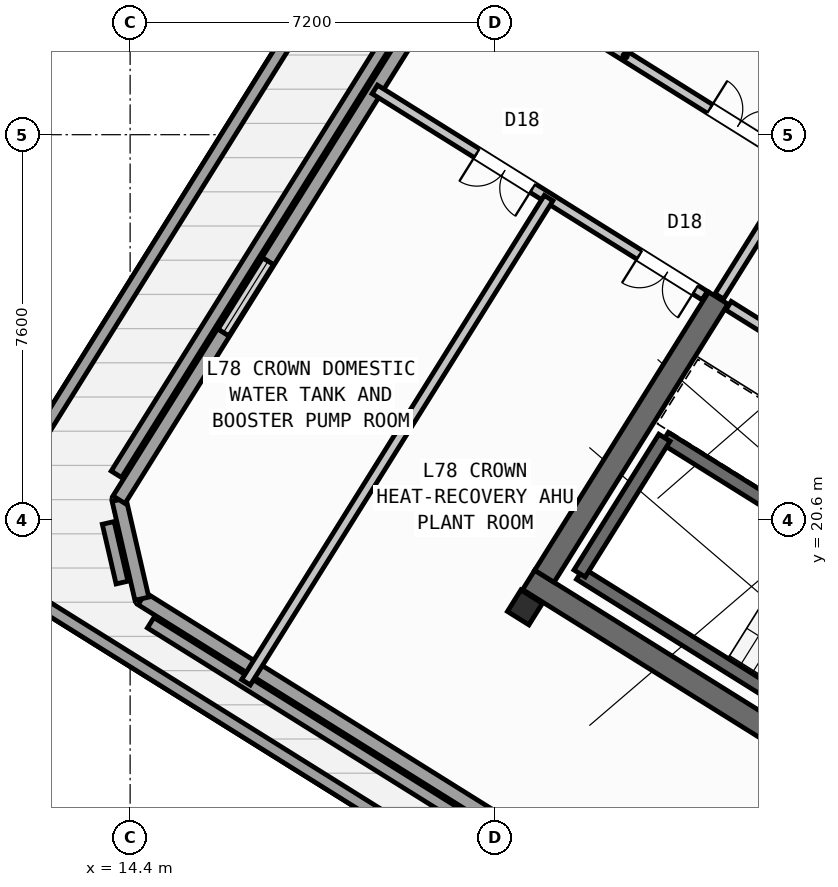
"""IFC4 building model, lengths in metres.
Left out: names, types, materials, properties, quantities, classifications, styles, units other than length and angle.
Written with IfcOpenShell. Run it as: python <this file> out.ifc"""

import sys

from ifc_helpers import new_model, si_unit, direction, frame, frame_2d, origin, origin_2d, place, context, subcontext, project, spatial, rectangle, hollow_rectangle, extrude, source, transform, mapped, element, fill, save


model = new_model("IFC4")
c1 = context("Model", 3, precision=1e-05, world=origin(), true_north=direction((0.0, 1.0)))
c2 = subcontext(c1, "Body", "Model", "MODEL_VIEW")
j1 = project(units=[si_unit("LENGTHUNIT", "METRE"), si_unit("PLANEANGLEUNIT", "RADIAN")], contexts=[c1])
p1 = place(None, origin())
s1 = spatial("IfcSite", under=j1, at=p1, CompositionType="ELEMENT")
p2 = place(p1, origin())
s2 = spatial("IfcBuilding", under=s1, at=p2, CompositionType="ELEMENT")
p3 = place(p2, frame((0.0, 0.0, 306.0)))
s3 = spatial("IfcBuildingStorey", under=s2, at=p3, CompositionType="ELEMENT", Elevation=306.0)
p4 = place(p3, frame((33.324, 12.503, 0.0), z_axis=(0.0, 0.0, 1.0), x_axis=(-0.848043529849, 0.529926571782, 0.0)))
e1 = element("IfcWall", 1, at=p4, inside=s3, PredefinedType="SHEAR", context=c2, shape_type="SweptSolid", body=[
    extrude(rectangle(XDim=13.04, YDim=0.45, at=frame_2d((6.52, 0.0))), origin(), (0.0, 0.0, 1.0), 3.32),
])
p5 = place(p3, frame((26.007, 24.976, 0.0), z_axis=(0.0, 0.0, 1.0), x_axis=(-0.529931155655, -0.848040665456, 0.0)))
e2 = element("IfcWall", 2, at=p5, inside=s3, PredefinedType="SHEAR", context=c2, shape_type="SweptSolid", body=[
    extrude(rectangle(XDim=6.475, YDim=0.45, at=frame_2d((3.238, 0.0))), origin(), (0.0, 0.0, 1.0), 3.32),
])
m1 = source(origin(), c2, "Body", "SweptSolid", [
    extrude(hollow_rectangle(XDim=0.5, YDim=0.5, WallThickness=0.025, at=origin_2d()), origin(), (0.0, 0.0, 1.0), 3.6),
])
p6 = place(p3, frame((22.191, 18.87, 0.0), z_axis=(0.0, 0.0, 1.0), x_axis=(-0.848048096156, 0.529919264233, 0.0)))
e3 = element("IfcColumn", 3, at=p6, inside=s3, PredefinedType="COLUMN", context=c2, shape_type="MappedRepresentation", body=[
    mapped(m1, transform((0.0, 0.0, 0.0), scale=1.0)),
])
p7 = place(p3, frame((29.733, 8.261, 0.0), z_axis=(0.0, 0.0, 1.0), x_axis=(-0.848045488864, 0.529923436751, 0.0)))
e4 = element("IfcWall", 4, at=p7, inside=s3, PredefinedType="PARAPET", context=c2, shape_type="SweptSolid", body=[
    extrude(rectangle(XDim=20.056, YDim=0.24, at=frame_2d((10.028, 0.0))), origin(), (0.0, 0.0, 1.0), 1.15),
])
p8 = place(p3, frame((12.129, 21.469, 0.0), z_axis=(0.0, 0.0, 1.0), x_axis=(0.529920637882, 0.848047237804, 0.0)))
e5 = element("IfcWall", 5, at=p8, inside=s3, PredefinedType="PARAPET", context=c2, shape_type="SweptSolid", body=[
    extrude(rectangle(XDim=16.256, YDim=0.24, at=frame_2d((8.128, 0.0))), origin(), (0.0, 0.0, 1.0), 1.15),
])
p9 = place(p3, frame((22.203, 34.42, 0.0), z_axis=(0.0, 0.0, 1.0), x_axis=(-0.529922606747, -0.848046007513, 0.0)))
e6 = element("IfcWall", 6, at=p9, inside=s3, PredefinedType="PARAPET", context=c2, shape_type="SweptSolid", body=[
    extrude(rectangle(XDim=15.238, YDim=0.24, at=frame_2d((7.619, 0.0))), origin(), (0.0, 0.0, 1.0), 1.15),
])
p10 = place(p3, frame((13.968, 20.538, 0.0), z_axis=(0.0, 0.0, 1.0), x_axis=(0.225051308725, -0.974346913805, 0.0)))
e7 = element("IfcWall", 7, at=p10, inside=s3, PredefinedType="PARAPET", context=c2, shape_type="SweptSolid", body=[
    extrude(rectangle(XDim=1.208, YDim=0.24, at=frame_2d((0.604, 0.0))), origin(), (0.0, 0.0, 1.0), 1.15),
])
p11 = place(p3, frame((14.805, 18.568, 0.0), z_axis=(0.0, 0.0, 1.0), x_axis=(0.848046564959, -0.529921714653, 0.0)))
e8 = element("IfcWall", 8, at=p11, inside=s3, PredefinedType="PARAPET", context=c2, shape_type="SweptSolid", body=[
    extrude(rectangle(XDim=18.188, YDim=0.24, at=frame_2d((9.094, 0.0))), origin(), (0.0, 0.0, 1.0), 1.15),
])
p12 = place(p3, frame((30.731, 8.982, 0.0), z_axis=(0.0, 0.0, 1.0), x_axis=(-0.848046707212, 0.529921487002, 0.0)))
e9 = element("IfcWall", 9, at=p12, inside=s3, PredefinedType="STANDARD", context=c2, shape_type="SweptSolid", body=[
    extrude(rectangle(XDim=18.984, YDim=0.28, at=frame_2d((9.492, 0.0))), origin(), (0.0, 0.0, 1.0), 3.32),
])
p13 = place(p12, frame((7.283, 0.0, 0.85)))
e10 = element("IfcOpeningElement", 10, at=p13, cuts=e9, PredefinedType="OPENING", context=c2, shape_type="SweptSolid", body=[
    extrude(rectangle(XDim=1.7, YDim=1.6, at=frame_2d((0.85, 0.8))), frame((0.0, 0.15, 0.0), z_axis=(0.0, -1.0, 0.0), x_axis=(1.0, 0.0, 0.0)), (0.0, 0.0, 1.0), 0.3),
])
p14 = place(p3, frame((14.632, 19.042, 0.0), z_axis=(0.0, 0.0, 1.0), x_axis=(-0.224992881738, 0.974360407225, 0.0)))
e11 = element("IfcWall", 11, at=p14, inside=s3, PredefinedType="STANDARD", context=c2, shape_type="SweptSolid", body=[
    extrude(rectangle(XDim=2.005, YDim=0.28, at=frame_2d((1.003, 0.0))), origin(), (0.0, 0.0, 1.0), 3.32),
])
p15 = place(p3, frame((14.18, 20.996, 0.0), z_axis=(0.0, 0.0, 1.0), x_axis=(0.529922292894, 0.848046203632, 0.0)))
e12 = element("IfcWall", 12, at=p15, inside=s3, PredefinedType="STANDARD", context=c2, shape_type="SweptSolid", body=[
    extrude(rectangle(XDim=16.034, YDim=0.28, at=frame_2d((8.017, 0.0))), origin(), (0.0, 0.0, 1.0), 3.32),
])
p16 = place(p15, frame((3.871, 0.0, 0.85)))
e13 = element("IfcOpeningElement", 13, at=p16, cuts=e12, PredefinedType="OPENING", context=c2, shape_type="SweptSolid", body=[
    extrude(rectangle(XDim=1.7, YDim=1.6, at=frame_2d((0.85, 0.8))), frame((0.0, 0.15, 0.0), z_axis=(0.0, -1.0, 0.0), x_axis=(1.0, 0.0, 0.0)), (0.0, 0.0, 1.0), 0.3),
])
p17 = place(p15, frame((13.578, 0.0, 0.85)))
e14 = element("IfcOpeningElement", 14, at=p17, cuts=e12, PredefinedType="OPENING", context=c2, shape_type="SweptSolid", body=[
    extrude(rectangle(XDim=1.7, YDim=1.6, at=frame_2d((0.85, 0.8))), frame((0.0, 0.15, 0.0), z_axis=(0.0, -1.0, 0.0), x_axis=(1.0, 0.0, 0.0)), (0.0, 0.0, 1.0), 0.3),
])
p18 = place(p3, frame((24.631, 35.045, 0.0), z_axis=(0.0, 0.0, 1.0), x_axis=(0.848046707212, -0.529921487002, 0.0)))
e15 = element("IfcWall", 15, at=p18, inside=s3, PredefinedType="STANDARD", context=c2, shape_type="SweptSolid", body=[
    extrude(rectangle(XDim=18.984, YDim=0.28, at=frame_2d((9.492, 0.0))), origin(), (0.0, 0.0, 1.0), 3.32),
])
p19 = place(p18, frame((2.326, 0.0, 0.85)))
e16 = element("IfcOpeningElement", 16, at=p19, cuts=e15, PredefinedType="OPENING", context=c2, shape_type="SweptSolid", body=[
    extrude(rectangle(XDim=1.7, YDim=1.6, at=frame_2d((0.85, 0.8))), frame((0.0, 0.15, 0.0), z_axis=(0.0, -1.0, 0.0), x_axis=(1.0, 0.0, 0.0)), (0.0, 0.0, 1.0), 0.3),
])
p20 = place(p18, frame((11.968, 0.0, 0.85)))
e17 = element("IfcOpeningElement", 17, at=p20, cuts=e15, PredefinedType="OPENING", context=c2, shape_type="SweptSolid", body=[
    extrude(rectangle(XDim=1.7, YDim=1.6, at=frame_2d((0.85, 0.8))), frame((0.0, 0.15, 0.0), z_axis=(0.0, -1.0, 0.0), x_axis=(1.0, 0.0, 0.0)), (0.0, 0.0, 1.0), 0.3),
])
p21 = place(p3, frame((29.605, 15.581, 0.0), z_axis=(0.0, 0.0, 1.0), x_axis=(-0.848036911448, 0.529937163087, 0.0)))
e18 = element("IfcWall", 18, at=p21, inside=s3, PredefinedType="SHEAR", context=c2, shape_type="SweptSolid", body=[
    extrude(rectangle(XDim=7.46, YDim=0.26, at=frame_2d((3.73, 0.0))), origin(), (0.0, 0.0, 1.0), 3.32),
])
p22 = place(p3, frame((31.28, 18.261, 0.0), z_axis=(0.0, 0.0, 1.0), x_axis=(-0.848051618787, 0.529913626805, 0.0)))
e19 = element("IfcWall", 19, at=p22, inside=s3, PredefinedType="SHEAR", context=c2, shape_type="SweptSolid", body=[
    extrude(rectangle(XDim=7.46, YDim=0.26, at=frame_2d((3.73, 0.0))), origin(), (0.0, 0.0, 1.0), 3.32),
])
p23 = place(p22, frame((0.36, 0.0, 0.0)))
e20 = element("IfcOpeningElement", 20, at=p23, cuts=e19, PredefinedType="OPENING", context=c2, shape_type="SweptSolid", body=[
    extrude(rectangle(XDim=0.86, YDim=2.05, at=frame_2d((0.43, 1.025))), frame((0.0, 0.14, 0.0), z_axis=(0.0, -1.0, 0.0), x_axis=(1.0, 0.0, 0.0)), (0.0, 0.0, 1.0), 0.28),
])
p24 = place(p3, frame((24.945, 22.22, 0.0), z_axis=(0.0, 0.0, 1.0), x_axis=(-0.529908658664, -0.84805472316, 0.0)))
e21 = element("IfcWall", 21, at=p24, inside=s3, PredefinedType="SHEAR", context=c2, shape_type="SweptSolid", body=[
    extrude(rectangle(XDim=3.16, YDim=0.26, at=frame_2d((1.58, 0.0))), origin(), (0.0, 0.0, 1.0), 3.32),
])
p25 = place(p3, frame((31.525, 21.504, 0.0), z_axis=(0.0, 0.0, 1.0), x_axis=(-0.848042066329, 0.529928913853, 0.0)))
e22 = element("IfcWall", 22, at=p25, inside=s3, PredefinedType="STANDARD", context=c2, shape_type="SweptSolid", body=[
    extrude(rectangle(XDim=6.268, YDim=0.2, at=frame_2d((3.134, 0.0))), origin(), (0.0, 0.0, 1.0), 3.31),
])
p26 = place(p25, frame((4.4, 0.0, 0.0)))
e23 = element("IfcOpeningElement", 23, at=p26, cuts=e22, PredefinedType="OPENING", context=c2, shape_type="SweptSolid", body=[
    extrude(rectangle(XDim=0.86, YDim=2.05, at=frame_2d((0.43, 1.025))), frame((0.0, 0.11, 0.0), z_axis=(0.0, -1.0, 0.0), x_axis=(1.0, 0.0, 0.0)), (0.0, 0.0, 1.0), 0.22),
])
p27 = place(p25, frame((0.35, 0.0, 0.0)))
e24 = element("IfcOpeningElement", 24, at=p27, cuts=e22, PredefinedType="OPENING", context=c2, shape_type="SweptSolid", body=[
    extrude(rectangle(XDim=0.86, YDim=2.05, at=frame_2d((0.43, 1.025))), frame((0.0, 0.11, 0.0), z_axis=(0.0, -1.0, 0.0), x_axis=(1.0, 0.0, 0.0)), (0.0, 0.0, 1.0), 0.22),
])
p28 = place(p3, frame((27.596, 27.52, 0.0), z_axis=(0.0, 0.0, 1.0), x_axis=(-0.529865479138, -0.848081702443, 0.0)))
e25 = element("IfcWall", 25, at=p28, inside=s3, PredefinedType="STANDARD", context=c2, shape_type="SweptSolid", body=[
    extrude(rectangle(XDim=2.96, YDim=0.2, at=frame_2d((1.48, 0.0))), origin(), (0.0, 0.0, 1.0), 3.31),
])
p29 = place(p28, frame((0.16, 0.0, 0.0)))
e26 = element("IfcOpeningElement", 26, at=p29, cuts=e25, PredefinedType="OPENING", context=c2, shape_type="SweptSolid", body=[
    extrude(rectangle(XDim=0.86, YDim=2.05, at=frame_2d((0.43, 1.025))), frame((0.0, 0.11, 0.0), z_axis=(0.0, -1.0, 0.0), x_axis=(1.0, 0.0, 0.0)), (0.0, 0.0, 1.0), 0.22),
])
p30 = place(p3, frame((25.74, 25.025, 0.0), z_axis=(0.0, 0.0, 1.0), x_axis=(-0.848051891756, 0.529913189956, 0.0)))
e27 = element("IfcWall", 27, at=p30, inside=s3, PredefinedType="STANDARD", context=c2, shape_type="SweptSolid", body=[
    extrude(rectangle(XDim=7.678, YDim=0.2, at=frame_2d((3.839, 0.0))), origin(), (0.0, 0.0, 1.0), 3.31),
])
p31 = place(p30, frame((0.218, 0.0, 0.0)))
e28 = element("IfcOpeningElement", 28, at=p31, cuts=e27, PredefinedType="OPENING", context=c2, shape_type="SweptSolid", body=[
    extrude(rectangle(XDim=1.3, YDim=2.15, at=frame_2d((0.65, 1.075))), frame((0.0, 0.11, 0.0), z_axis=(0.0, -1.0, 0.0), x_axis=(1.0, 0.0, 0.0)), (0.0, 0.0, 1.0), 0.22),
])
p32 = place(p30, frame((4.003, 0.0, 0.0)))
e29 = element("IfcOpeningElement", 29, at=p32, cuts=e27, PredefinedType="OPENING", context=c2, shape_type="SweptSolid", body=[
    extrude(rectangle(XDim=1.3, YDim=2.15, at=frame_2d((0.65, 1.075))), frame((0.0, 0.11, 0.0), z_axis=(0.0, -1.0, 0.0), x_axis=(1.0, 0.0, 0.0)), (0.0, 0.0, 1.0), 0.22),
])
p33 = place(p3, frame((22.659, 26.95, 0.0), z_axis=(0.0, 0.0, 1.0), x_axis=(-0.52992299529, -0.848045764722, 0.0)))
e30 = element("IfcWall", 30, at=p33, inside=s3, PredefinedType="STANDARD", context=c2, shape_type="SweptSolid", body=[
    extrude(rectangle(XDim=11.27, YDim=0.2, at=frame_2d((5.635, 0.0))), origin(), (0.0, 0.0, 1.0), 3.31),
])
p34 = place(p3, frame((27.425, 27.721, 0.0), z_axis=(0.0, 0.0, 1.0), x_axis=(-0.848060820519, 0.529898900452, 0.0)))
e31 = element("IfcWall", 31, at=p34, inside=s3, PredefinedType="STANDARD", context=c2, shape_type="SweptSolid", body=[
    extrude(rectangle(XDim=7.678, YDim=0.2, at=frame_2d((3.839, 0.0))), origin(), (0.0, 0.0, 1.0), 3.31),
])
p35 = place(p34, frame((0.568, 0.0, 0.0)))
e32 = element("IfcOpeningElement", 32, at=p35, cuts=e31, PredefinedType="OPENING", context=c2, shape_type="SweptSolid", body=[
    extrude(rectangle(XDim=1.3, YDim=2.15, at=frame_2d((0.65, 1.075))), frame((0.0, 0.11, 0.0), z_axis=(0.0, -1.0, 0.0), x_axis=(1.0, 0.0, 0.0)), (0.0, 0.0, 1.0), 0.22),
])
m2 = source(origin(), c2, "Body", "SweptSolid", [
    extrude(rectangle(XDim=1.7, YDim=1.6, at=frame_2d((0.85, 0.8))), frame((0.0, 0.03, 0.0), z_axis=(0.0, -1.0, 0.0), x_axis=(1.0, 0.0, 0.0)), (0.0, 0.0, 1.0), 0.06),
])
p36 = place(p16, origin())
e33 = element("IfcWindow", 33, at=p36, inside=s3, PartitioningType="SINGLE_PANEL", PredefinedType="WINDOW", context=c2, shape_type="MappedRepresentation", body=[
    mapped(m2, transform((0.0, 0.0, 0.0), scale=1.0)),
])
fill(e13, e33)
m3 = source(origin(), c2, "Body", "SweptSolid", [
    extrude(rectangle(XDim=1.3, YDim=2.15, at=frame_2d((0.65, 1.075))), frame((0.0, 0.025, 0.0), z_axis=(0.0, -1.0, 0.0), x_axis=(1.0, 0.0, 0.0)), (0.0, 0.0, 1.0), 0.05),
])
p37 = place(p31, origin())
e34 = element("IfcDoor", 34, at=p37, inside=s3, OperationType="DOUBLE_DOOR_SINGLE_SWING", PredefinedType="DOOR", context=c2, shape_type="MappedRepresentation", body=[
    mapped(m3, transform((0.0, 0.0, 0.0), scale=1.0)),
])
fill(e28, e34)
p38 = place(p32, origin())
e35 = element("IfcDoor", 35, at=p38, inside=s3, OperationType="DOUBLE_DOOR_SINGLE_SWING", PredefinedType="DOOR", context=c2, shape_type="MappedRepresentation", body=[
    mapped(m3, transform((0.0, 0.0, 0.0), scale=1.0)),
])
fill(e29, e35)
p39 = place(p35, frame((1.3, 0.0, 0.0), z_axis=(0.0, 0.0, 1.0), x_axis=(-1.0, 0.0, 0.0)))
e36 = element("IfcDoor", 36, at=p39, inside=s3, OperationType="DOUBLE_DOOR_SINGLE_SWING", PredefinedType="DOOR", context=c2, shape_type="MappedRepresentation", body=[
    mapped(m3, transform((0.0, 0.0, 0.0), scale=1.0)),
])
fill(e32, e36)
save(model, sys.argv[1])
